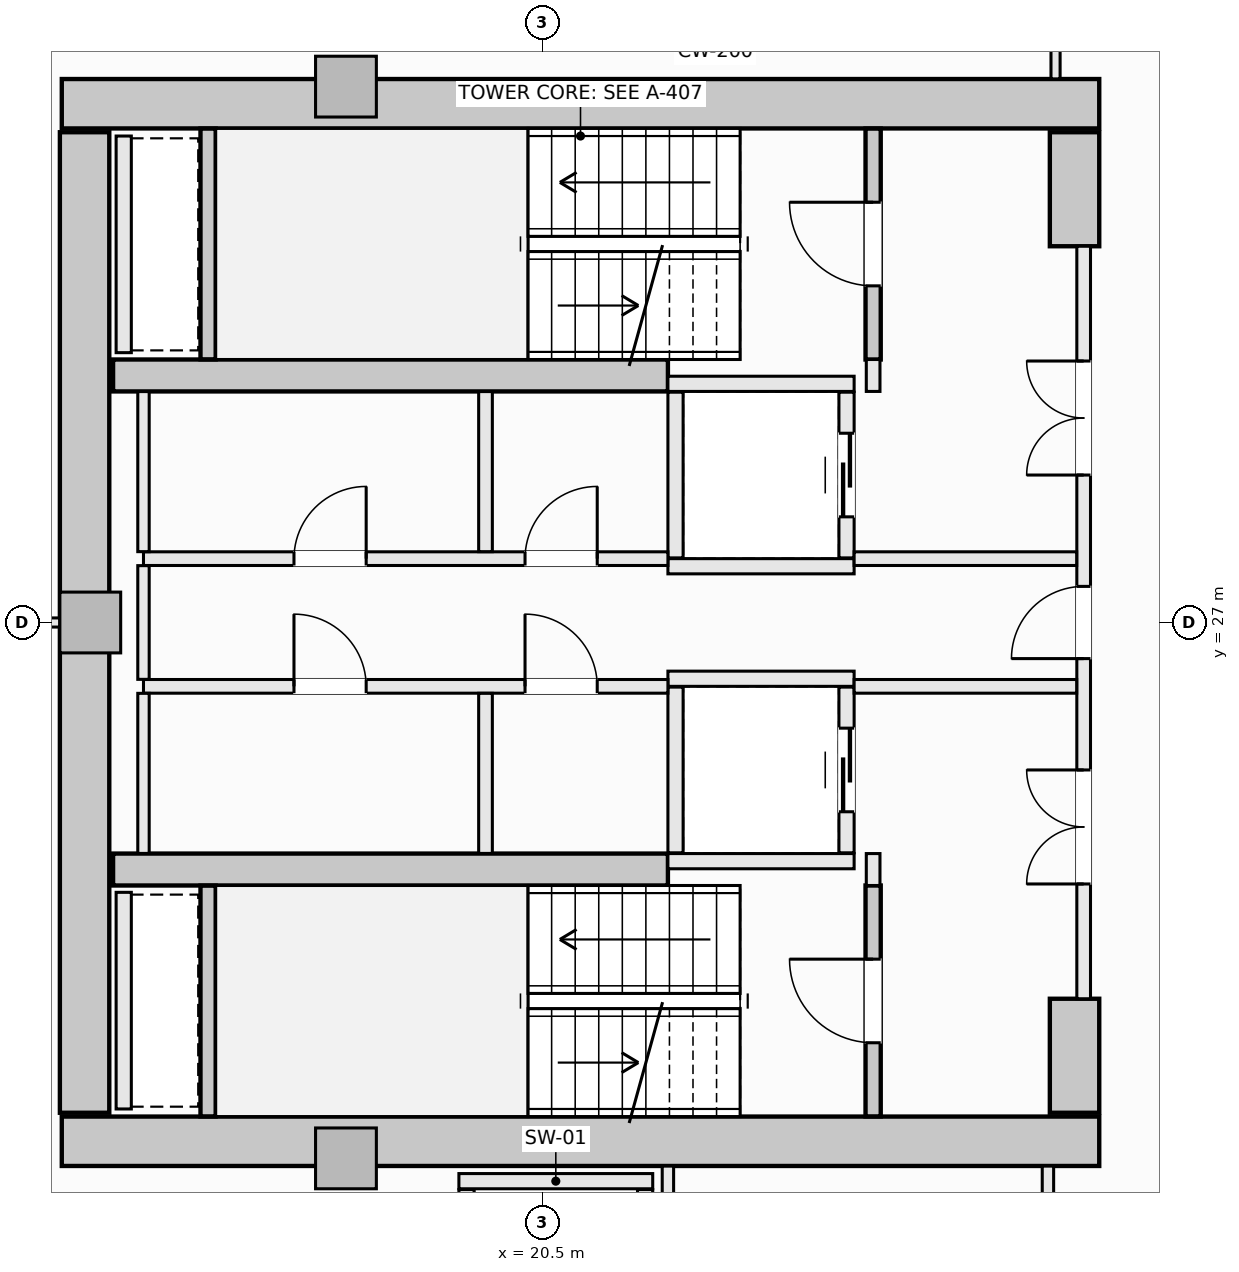
"""IFC4 building model, lengths in metres.
Left out: names, types, materials, properties, quantities, classifications, styles, units other than length and angle.
Written with IfcOpenShell. Run it as: python <this file> out.ifc"""

import sys

from ifc_helpers import new_model, si_unit, direction, frame, frame_2d, origin, origin_2d, place, context, subcontext, project, spatial, rectangle, extrude, element, fill, save


model = new_model("IFC4")
c1 = context("Model", 3, precision=1e-05, world=origin(), true_north=direction((0.0, 1.0)))
c2 = subcontext(c1, "Body", "Model", "MODEL_VIEW")
j1 = project(units=[si_unit("LENGTHUNIT", "METRE"), si_unit("PLANEANGLEUNIT", "RADIAN")], contexts=[c1])
p1 = place(None, origin())
s1 = spatial("IfcSite", under=j1, at=p1, CompositionType="ELEMENT")
p2 = place(p1, origin())
s2 = spatial("IfcBuilding", under=s1, at=p2, CompositionType="ELEMENT")
p3 = place(p2, frame((0.0, 0.0, 163.1)))
s3 = spatial("IfcBuildingStorey", under=s2, at=p3, CompositionType="ELEMENT", Elevation=163.1)
for number, where, z_axis, x_axis in (
    (1, (14.175, 33.825, -0.27), (0.0, 0.0, 1.0), (1.0, 0.0, 0.0)),
    (2, (14.175, 20.175, -0.27), (0.0, 0.0, 1.0), (1.0, 0.0, 0.0)),
):
    element("IfcWall", number, at=place(p3, frame(where, z_axis=z_axis, x_axis=x_axis)), inside=s3, PredefinedType="SHEAR", context=c2, shape_type="SweptSolid", body=[
        extrude(rectangle(XDim=13.65, YDim=0.65, at=frame_2d((6.825, 0.0))), origin(), (0.0, 0.0, 1.0), 3.4),
    ])
p4 = place(p3, frame((14.475, 20.55, -0.27), z_axis=(0.0, 0.0, 1.0), x_axis=(0.0, 1.0, 0.0)))
e3 = element("IfcWall", 3, at=p4, inside=s3, PredefinedType="SHEAR", context=c2, shape_type="SweptSolid", body=[
    extrude(rectangle(XDim=12.9, YDim=0.65, at=frame_2d((6.45, 0.0))), origin(), (0.0, 0.0, 1.0), 3.4),
])
for number, where, z_axis, x_axis in (
    (4, (27.5, 31.95, -0.27), (0.0, 0.0, 1.0), (0.0, 1.0, 0.0)),
    (5, (27.5, 20.55, -0.27), (0.0, 0.0, 1.0), (0.0, 1.0, 0.0)),
):
    element("IfcWall", number, at=place(p3, frame(where, z_axis=z_axis, x_axis=x_axis)), inside=s3, PredefinedType="SHEAR", context=c2, shape_type="SweptSolid", body=[
        extrude(rectangle(XDim=1.5, YDim=0.65, at=frame_2d((0.75, 0.0))), origin(), (0.0, 0.0, 1.0), 3.4),
    ])
for number, where, z_axis, x_axis in (
    (6, (14.85, 30.25, -0.27), (0.0, 0.0, 1.0), (1.0, 0.0, 0.0)),
    (7, (14.85, 23.75, -0.27), (0.0, 0.0, 1.0), (1.0, 0.0, 0.0)),
):
    element("IfcWall", number, at=place(p3, frame(where, z_axis=z_axis, x_axis=x_axis)), inside=s3, PredefinedType="SHEAR", context=c2, shape_type="SweptSolid", body=[
        extrude(rectangle(XDim=7.3, YDim=0.42, at=frame_2d((3.65, 0.0))), origin(), (0.0, 0.0, 1.0), 3.4),
    ])
for number, where, z_axis, x_axis in (
    (8, (17.914, 34.05, -0.27), (0.0, 0.0, 1.0), (1.0, 0.0, 0.0)),
    (9, (14.55, 27.0, -0.27), (0.0, 0.0, 1.0), (1.0, 0.0, 0.0)),
    (10, (17.914, 19.95, -0.27), (0.0, 0.0, 1.0), (1.0, 0.0, 0.0)),
):
    element("IfcColumn", number, at=place(p3, frame(where, z_axis=z_axis, x_axis=x_axis)), inside=s3, PredefinedType="PILASTER", context=c2, shape_type="SweptSolid", body=[
        extrude(rectangle(XDim=0.8, YDim=0.8, at=origin_2d()), origin(), (0.0, 0.0, 1.0), 3.4),
    ])
p5 = place(p3, frame((24.85, 30.46, -0.27), z_axis=(0.0, 0.0, 1.0), x_axis=(0.0, 1.0, 0.0)))
e11 = element("IfcWall", 11, at=p5, inside=s3, PredefinedType="SHEAR", context=c2, shape_type="SweptSolid", body=[
    extrude(rectangle(XDim=3.038, YDim=0.2, at=frame_2d((1.519, 0.0))), origin(), (0.0, 0.0, 1.0), 3.4),
])
p6 = place(p5, frame((0.969, 0.0, 0.27)))
e12 = element("IfcOpeningElement", 12, at=p6, cuts=e11, PredefinedType="OPENING", context=c2, shape_type="SweptSolid", body=[
    extrude(rectangle(XDim=1.1, YDim=2.15, at=frame_2d((0.55, 1.075))), frame((0.0, 0.11, 0.0), z_axis=(0.0, -1.0, 0.0), x_axis=(1.0, 0.0, 0.0)), (0.0, 0.0, 1.0), 0.22),
])
p7 = place(p3, frame((16.1, 30.462, -0.27), z_axis=(0.0, 0.0, 1.0), x_axis=(0.0, 1.0, 0.0)))
e13 = element("IfcWall", 13, at=p7, inside=s3, PredefinedType="SHEAR", context=c2, shape_type="SweptSolid", body=[
    extrude(rectangle(XDim=3.036, YDim=0.2, at=frame_2d((1.518, 0.0))), origin(), (0.0, 0.0, 1.0), 3.4),
])
p8 = place(p3, frame((24.85, 20.502, -0.27), z_axis=(0.0, 0.0, 1.0), x_axis=(0.0, 1.0, 0.0)))
e14 = element("IfcWall", 14, at=p8, inside=s3, PredefinedType="SHEAR", context=c2, shape_type="SweptSolid", body=[
    extrude(rectangle(XDim=3.038, YDim=0.2, at=frame_2d((1.519, 0.0))), origin(), (0.0, 0.0, 1.0), 3.4),
])
p9 = place(p8, frame((0.969, 0.0, 0.27)))
e15 = element("IfcOpeningElement", 15, at=p9, cuts=e14, PredefinedType="OPENING", context=c2, shape_type="SweptSolid", body=[
    extrude(rectangle(XDim=1.1, YDim=2.15, at=frame_2d((0.55, 1.075))), frame((0.0, 0.11, 0.0), z_axis=(0.0, -1.0, 0.0), x_axis=(1.0, 0.0, 0.0)), (0.0, 0.0, 1.0), 0.22),
])
p10 = place(p3, frame((16.1, 20.502, -0.27), z_axis=(0.0, 0.0, 1.0), x_axis=(0.0, 1.0, 0.0)))
e16 = element("IfcWall", 16, at=p10, inside=s3, PredefinedType="SHEAR", context=c2, shape_type="SweptSolid", body=[
    extrude(rectangle(XDim=3.036, YDim=0.2, at=frame_2d((1.518, 0.0))), origin(), (0.0, 0.0, 1.0), 3.4),
])
for number, where, z_axis, x_axis in (
    (17, (22.15, 30.14, 0.0), (0.0, 0.0, 1.0), (1.0, 0.0, 0.0)),
    (18, (22.15, 27.74, 0.0), (0.0, 0.0, 1.0), (1.0, 0.0, 0.0)),
):
    element("IfcWall", number, at=place(p3, frame(where, z_axis=z_axis, x_axis=x_axis)), inside=s3, PredefinedType="SOLIDWALL", context=c2, shape_type="SweptSolid", body=[
        extrude(rectangle(XDim=2.45, YDim=0.2, at=frame_2d((1.225, 0.0))), origin(), (0.0, 0.0, 1.0), 3.13),
    ])
p11 = place(p3, frame((22.25, 27.85, 0.0), z_axis=(0.0, 0.0, 1.0), x_axis=(0.0, 1.0, 0.0)))
e19 = element("IfcWall", 19, at=p11, inside=s3, PredefinedType="SOLIDWALL", context=c2, shape_type="SweptSolid", body=[
    extrude(rectangle(XDim=2.18, YDim=0.2, at=frame_2d((1.09, 0.0))), origin(), (0.0, 0.0, 1.0), 3.13),
])
p12 = place(p3, frame((24.5, 27.85, 0.0), z_axis=(0.0, 0.0, 1.0), x_axis=(0.0, 1.0, 0.0)))
e20 = element("IfcWall", 20, at=p12, inside=s3, PredefinedType="SOLIDWALL", context=c2, shape_type="SweptSolid", body=[
    extrude(rectangle(XDim=2.18, YDim=0.2, at=frame_2d((1.09, 0.0))), origin(), (0.0, 0.0, 1.0), 3.13),
])
p13 = place(p12, frame((0.54, 0.0, 0.0)))
e21 = element("IfcOpeningElement", 21, at=p13, cuts=e20, PredefinedType="OPENING", context=c2, shape_type="SweptSolid", body=[
    extrude(rectangle(XDim=1.1, YDim=2.2, at=frame_2d((0.55, 1.1))), frame((0.0, 0.11, 0.0), z_axis=(0.0, -1.0, 0.0), x_axis=(1.0, 0.0, 0.0)), (0.0, 0.0, 1.0), 0.22),
])
for number, where, z_axis, x_axis in (
    (22, (22.15, 26.26, 0.0), (0.0, 0.0, 1.0), (1.0, 0.0, 0.0)),
    (23, (22.15, 23.86, 0.0), (0.0, 0.0, 1.0), (1.0, 0.0, 0.0)),
):
    element("IfcWall", number, at=place(p3, frame(where, z_axis=z_axis, x_axis=x_axis)), inside=s3, PredefinedType="SOLIDWALL", context=c2, shape_type="SweptSolid", body=[
        extrude(rectangle(XDim=2.45, YDim=0.2, at=frame_2d((1.225, 0.0))), origin(), (0.0, 0.0, 1.0), 3.13),
    ])
p14 = place(p3, frame((22.25, 23.97, 0.0), z_axis=(0.0, 0.0, 1.0), x_axis=(0.0, 1.0, 0.0)))
e24 = element("IfcWall", 24, at=p14, inside=s3, PredefinedType="SOLIDWALL", context=c2, shape_type="SweptSolid", body=[
    extrude(rectangle(XDim=2.18, YDim=0.2, at=frame_2d((1.09, 0.0))), origin(), (0.0, 0.0, 1.0), 3.13),
])
p15 = place(p3, frame((24.5, 23.97, 0.0), z_axis=(0.0, 0.0, 1.0), x_axis=(0.0, 1.0, 0.0)))
e25 = element("IfcWall", 25, at=p15, inside=s3, PredefinedType="SOLIDWALL", context=c2, shape_type="SweptSolid", body=[
    extrude(rectangle(XDim=2.18, YDim=0.2, at=frame_2d((1.09, 0.0))), origin(), (0.0, 0.0, 1.0), 3.13),
])
p16 = place(p15, frame((0.54, 0.0, 0.0)))
e26 = element("IfcOpeningElement", 26, at=p16, cuts=e25, PredefinedType="OPENING", context=c2, shape_type="SweptSolid", body=[
    extrude(rectangle(XDim=1.1, YDim=2.2, at=frame_2d((0.55, 1.1))), frame((0.0, 0.11, 0.0), z_axis=(0.0, -1.0, 0.0), x_axis=(1.0, 0.0, 0.0)), (0.0, 0.0, 1.0), 0.22),
])
p17 = place(p3, frame((19.4, 19.65, 0.0), z_axis=(0.0, 0.0, 1.0), x_axis=(1.0, 0.0, 0.0)))
e27 = element("IfcWall", 27, at=p17, inside=s3, PredefinedType="SOLIDWALL", context=c2, shape_type="SweptSolid", body=[
    extrude(rectangle(XDim=2.55, YDim=0.2, at=frame_2d((1.275, 0.0))), origin(), (0.0, 0.0, 1.0), 3.13),
])
for number, where, z_axis, x_axis in (
    (28, (19.5, 17.01, 0.0), (0.0, 0.0, 1.0), (0.0, 1.0, 0.0)),
    (29, (21.85, 17.01, 0.0), (0.0, 0.0, 1.0), (0.0, 1.0, 0.0)),
):
    element("IfcWall", number, at=place(p3, frame(where, z_axis=z_axis, x_axis=x_axis)), inside=s3, PredefinedType="SOLIDWALL", context=c2, shape_type="SweptSolid", body=[
        extrude(rectangle(XDim=2.53, YDim=0.2, at=frame_2d((1.265, 0.0))), origin(), (0.0, 0.0, 1.0), 3.13),
    ])
for number, where, z_axis, x_axis in (
    (30, (14.99, 30.55, 0.0), (0.0, 0.0, 1.0), (0.0, 1.0, 0.0)),
    (31, (14.99, 20.6, 0.0), (0.0, 0.0, 1.0), (0.0, 1.0, 0.0)),
):
    element("IfcWall", number, at=place(p3, frame(where, z_axis=z_axis, x_axis=x_axis)), inside=s3, PredefinedType="SOLIDWALL", context=c2, shape_type="SweptSolid", body=[
        extrude(rectangle(XDim=2.85, YDim=0.2, at=frame_2d((1.425, 0.0))), origin(), (0.0, 0.0, 1.0), 3.13),
    ])
for number, where, z_axis, x_axis in (
    (32, (24.85, 23.54, 0.0), (0.0, 0.0, 1.0), (0.0, 1.0, 0.0)),
    (33, (24.85, 30.04, 0.0), (0.0, 0.0, 1.0), (0.0, 1.0, 0.0)),
):
    element("IfcWall", number, at=place(p3, frame(where, z_axis=z_axis, x_axis=x_axis)), inside=s3, PredefinedType="SOLIDWALL", context=c2, shape_type="SweptSolid", body=[
        extrude(rectangle(XDim=0.42, YDim=0.18, at=frame_2d((0.21, 0.0))), origin(), (0.0, 0.0, 1.0), 3.13),
    ])
p18 = place(p3, frame((27.62, 22.05, 0.0), z_axis=(0.0, 0.0, 1.0), x_axis=(0.0, 1.0, 0.0)))
e34 = element("IfcWall", 34, at=p18, inside=s3, PredefinedType="SOLIDWALL", context=c2, shape_type="SweptSolid", body=[
    extrude(rectangle(XDim=9.9, YDim=0.18, at=frame_2d((4.95, 0.0))), origin(), (0.0, 0.0, 1.0), 3.13),
])
p19 = place(p18, frame((4.475, 0.0, 0.0)))
e35 = element("IfcOpeningElement", 35, at=p19, cuts=e34, PredefinedType="OPENING", context=c2, shape_type="SweptSolid", body=[
    extrude(rectangle(XDim=0.95, YDim=2.1, at=frame_2d((0.475, 1.05))), frame((0.0, 0.1, 0.0), z_axis=(0.0, -1.0, 0.0), x_axis=(1.0, 0.0, 0.0)), (0.0, 0.0, 1.0), 0.2),
])
p20 = place(p18, frame((6.89, 0.0, 0.0)))
e36 = element("IfcOpeningElement", 36, at=p20, cuts=e34, PredefinedType="OPENING", context=c2, shape_type="SweptSolid", body=[
    extrude(rectangle(XDim=1.5, YDim=2.2, at=frame_2d((0.75, 1.1))), frame((0.0, 0.1, 0.0), z_axis=(0.0, -1.0, 0.0), x_axis=(1.0, 0.0, 0.0)), (0.0, 0.0, 1.0), 0.2),
])
p21 = place(p18, frame((1.51, 0.0, 0.0)))
e37 = element("IfcOpeningElement", 37, at=p21, cuts=e34, PredefinedType="OPENING", context=c2, shape_type="SweptSolid", body=[
    extrude(rectangle(XDim=1.5, YDim=2.2, at=frame_2d((0.75, 1.1))), frame((0.0, 0.1, 0.0), z_axis=(0.0, -1.0, 0.0), x_axis=(1.0, 0.0, 0.0)), (0.0, 0.0, 1.0), 0.2),
])
p22 = place(p3, frame((15.25, 27.84, 0.0), z_axis=(0.0, 0.0, 1.0), x_axis=(1.0, 0.0, 0.0)))
e38 = element("IfcWall", 38, at=p22, inside=s3, PredefinedType="SOLIDWALL", context=c2, shape_type="SweptSolid", body=[
    extrude(rectangle(XDim=6.9, YDim=0.18, at=frame_2d((3.45, 0.0))), origin(), (0.0, 0.0, 1.0), 3.13),
])
p23 = place(p22, frame((5.02, 0.0, 0.0)))
e39 = element("IfcOpeningElement", 39, at=p23, cuts=e38, PredefinedType="OPENING", context=c2, shape_type="SweptSolid", body=[
    extrude(rectangle(XDim=0.95, YDim=2.1, at=frame_2d((0.475, 1.05))), frame((0.0, 0.1, 0.0), z_axis=(0.0, -1.0, 0.0), x_axis=(1.0, 0.0, 0.0)), (0.0, 0.0, 1.0), 0.2),
])
p24 = place(p22, frame((1.98, 0.0, 0.0)))
e40 = element("IfcOpeningElement", 40, at=p24, cuts=e38, PredefinedType="OPENING", context=c2, shape_type="SweptSolid", body=[
    extrude(rectangle(XDim=0.95, YDim=2.1, at=frame_2d((0.475, 1.05))), frame((0.0, 0.1, 0.0), z_axis=(0.0, -1.0, 0.0), x_axis=(1.0, 0.0, 0.0)), (0.0, 0.0, 1.0), 0.2),
])
p25 = place(p3, frame((24.6, 27.84, 0.0), z_axis=(0.0, 0.0, 1.0), x_axis=(1.0, 0.0, 0.0)))
e41 = element("IfcWall", 41, at=p25, inside=s3, PredefinedType="SOLIDWALL", context=c2, shape_type="SweptSolid", body=[
    extrude(rectangle(XDim=2.928, YDim=0.18, at=frame_2d((1.464, 0.0))), origin(), (0.0, 0.0, 1.0), 3.13),
])
p26 = place(p3, frame((15.25, 26.16, 0.0), z_axis=(0.0, 0.0, 1.0), x_axis=(1.0, 0.0, 0.0)))
e42 = element("IfcWall", 42, at=p26, inside=s3, PredefinedType="SOLIDWALL", context=c2, shape_type="SweptSolid", body=[
    extrude(rectangle(XDim=6.9, YDim=0.18, at=frame_2d((3.45, 0.0))), origin(), (0.0, 0.0, 1.0), 3.13),
])
p27 = place(p26, frame((5.02, 0.0, 0.0)))
e43 = element("IfcOpeningElement", 43, at=p27, cuts=e42, PredefinedType="OPENING", context=c2, shape_type="SweptSolid", body=[
    extrude(rectangle(XDim=0.95, YDim=2.1, at=frame_2d((0.475, 1.05))), frame((0.0, 0.1, 0.0), z_axis=(0.0, -1.0, 0.0), x_axis=(1.0, 0.0, 0.0)), (0.0, 0.0, 1.0), 0.2),
])
p28 = place(p26, frame((1.98, 0.0, 0.0)))
e44 = element("IfcOpeningElement", 44, at=p28, cuts=e42, PredefinedType="OPENING", context=c2, shape_type="SweptSolid", body=[
    extrude(rectangle(XDim=0.95, YDim=2.1, at=frame_2d((0.475, 1.05))), frame((0.0, 0.1, 0.0), z_axis=(0.0, -1.0, 0.0), x_axis=(1.0, 0.0, 0.0)), (0.0, 0.0, 1.0), 0.2),
])
p29 = place(p3, frame((24.6, 26.16, 0.0), z_axis=(0.0, 0.0, 1.0), x_axis=(1.0, 0.0, 0.0)))
e45 = element("IfcWall", 45, at=p29, inside=s3, PredefinedType="SOLIDWALL", context=c2, shape_type="SweptSolid", body=[
    extrude(rectangle(XDim=2.928, YDim=0.18, at=frame_2d((1.464, 0.0))), origin(), (0.0, 0.0, 1.0), 3.13),
])
p30 = place(p3, frame((15.25, 23.962, 0.0), z_axis=(0.0, 0.0, 1.0), x_axis=(0.0, 1.0, 0.0)))
e46 = element("IfcWall", 46, at=p30, inside=s3, PredefinedType="PARTITIONING", context=c2, shape_type="SweptSolid", body=[
    extrude(rectangle(XDim=2.106, YDim=0.15, at=frame_2d((1.053, 0.0))), origin(), (0.0, 0.0, 1.0), 3.13),
])
p31 = place(p3, frame((15.25, 26.252, 0.0), z_axis=(0.0, 0.0, 1.0), x_axis=(0.0, 1.0, 0.0)))
e47 = element("IfcWall", 47, at=p31, inside=s3, PredefinedType="PARTITIONING", context=c2, shape_type="SweptSolid", body=[
    extrude(rectangle(XDim=1.496, YDim=0.15, at=frame_2d((0.748, 0.0))), origin(), (0.0, 0.0, 1.0), 3.13),
])
p32 = place(p3, frame((15.25, 27.932, 0.0), z_axis=(0.0, 0.0, 1.0), x_axis=(0.0, 1.0, 0.0)))
e48 = element("IfcWall", 48, at=p32, inside=s3, PredefinedType="PARTITIONING", context=c2, shape_type="SweptSolid", body=[
    extrude(rectangle(XDim=2.106, YDim=0.15, at=frame_2d((1.053, 0.0))), origin(), (0.0, 0.0, 1.0), 3.13),
])
for number, where, z_axis, x_axis in (
    (49, (19.75, 23.962, 0.0), (0.0, 0.0, 1.0), (0.0, 1.0, 0.0)),
    (50, (19.75, 27.932, 0.0), (0.0, 0.0, 1.0), (0.0, 1.0, 0.0)),
):
    element("IfcWall", number, at=place(p3, frame(where, z_axis=z_axis, x_axis=x_axis)), inside=s3, PredefinedType="SOLIDWALL", context=c2, shape_type="SweptSolid", body=[
        extrude(rectangle(XDim=2.106, YDim=0.18, at=frame_2d((1.053, 0.0))), origin(), (0.0, 0.0, 1.0), 3.13),
    ])
p33 = place(p3, frame((22.15, 17.127, 0.0), z_axis=(0.0, 0.0, 1.0), x_axis=(0.0, 1.0, 0.0)))
e51 = element("IfcWall", 51, at=p33, inside=s3, PredefinedType="PARTITIONING", context=c2, shape_type="SweptSolid", body=[
    extrude(rectangle(XDim=2.721, YDim=0.15, at=frame_2d((1.36, 0.0))), origin(), (0.0, 0.0, 1.0), 3.13),
])
p34 = place(p3, frame((27.15, 17.127, 0.0), z_axis=(0.0, 0.0, 1.0), x_axis=(0.0, 1.0, 0.0)))
e52 = element("IfcWall", 52, at=p34, inside=s3, PredefinedType="PARTITIONING", context=c2, shape_type="SweptSolid", body=[
    extrude(rectangle(XDim=2.721, YDim=0.15, at=frame_2d((1.36, 0.0))), origin(), (0.0, 0.0, 1.0), 3.13),
])
p35 = place(p34, frame((0.885, 0.0, 0.0)))
e53 = element("IfcOpeningElement", 53, at=p35, cuts=e52, PredefinedType="OPENING", context=c2, shape_type="SweptSolid", body=[
    extrude(rectangle(XDim=0.95, YDim=2.1, at=frame_2d((0.475, 1.05))), frame((0.0, 0.085, 0.0), z_axis=(0.0, -1.0, 0.0), x_axis=(1.0, 0.0, 0.0)), (0.0, 0.0, 1.0), 0.17),
])
p36 = place(p3, frame((27.25, 34.152, 0.0), z_axis=(0.0, 0.0, 1.0), x_axis=(0.0, 1.0, 0.0)))
e54 = element("IfcWall", 54, at=p36, inside=s3, PredefinedType="PARTITIONING", context=c2, shape_type="SweptSolid", body=[
    extrude(rectangle(XDim=0.806, YDim=0.12, at=frame_2d((0.403, 0.0))), origin(), (0.0, 0.0, 1.0), 3.13),
])
p37 = place(p3, frame((8.342, 27.0, 0.0), z_axis=(0.0, 0.0, 1.0), x_axis=(1.0, 0.0, 0.0)))
e55 = element("IfcWall", 55, at=p37, inside=s3, PredefinedType="PARTITIONING", context=c2, shape_type="SweptSolid", body=[
    extrude(rectangle(XDim=5.806, YDim=0.12, at=frame_2d((2.903, 0.0))), origin(), (0.0, 0.0, 1.0), 2.505),
])
p38 = place(p6, origin())
e56 = element("IfcDoor", 56, at=p38, inside=s3, OperationType="SINGLE_SWING_RIGHT", PredefinedType="DOOR", context=c2, shape_type="SweptSolid", body=[
    extrude(rectangle(XDim=1.1, YDim=2.15, at=frame_2d((0.55, 1.075))), frame((0.0, 0.025, 0.0), z_axis=(0.0, -1.0, 0.0), x_axis=(1.0, 0.0, 0.0)), (0.0, 0.0, 1.0), 0.05),
])
fill(e12, e56)
p39 = place(p9, origin())
e57 = element("IfcDoor", 57, at=p39, inside=s3, OperationType="SINGLE_SWING_RIGHT", PredefinedType="DOOR", context=c2, shape_type="SweptSolid", body=[
    extrude(rectangle(XDim=1.1, YDim=2.15, at=frame_2d((0.55, 1.075))), frame((0.0, 0.025, 0.0), z_axis=(0.0, -1.0, 0.0), x_axis=(1.0, 0.0, 0.0)), (0.0, 0.0, 1.0), 0.05),
])
fill(e15, e57)
p40 = place(p13, origin())
e58 = element("IfcDoor", 58, at=p40, inside=s3, OperationType="SLIDING_TO_LEFT", PredefinedType="DOOR", context=c2, shape_type="SweptSolid", body=[
    extrude(rectangle(XDim=1.1, YDim=2.2, at=frame_2d((0.55, 1.1))), frame((0.0, 0.025, 0.0), z_axis=(0.0, -1.0, 0.0), x_axis=(1.0, 0.0, 0.0)), (0.0, 0.0, 1.0), 0.05),
])
fill(e21, e58)
p41 = place(p16, origin())
e59 = element("IfcDoor", 59, at=p41, inside=s3, OperationType="SLIDING_TO_LEFT", PredefinedType="DOOR", context=c2, shape_type="SweptSolid", body=[
    extrude(rectangle(XDim=1.1, YDim=2.2, at=frame_2d((0.55, 1.1))), frame((0.0, 0.025, 0.0), z_axis=(0.0, -1.0, 0.0), x_axis=(1.0, 0.0, 0.0)), (0.0, 0.0, 1.0), 0.05),
])
fill(e26, e59)
p42 = place(p19, origin())
e60 = element("IfcDoor", 60, at=p42, inside=s3, OperationType="SINGLE_SWING_LEFT", PredefinedType="DOOR", context=c2, shape_type="SweptSolid", body=[
    extrude(rectangle(XDim=0.95, YDim=2.1, at=frame_2d((0.475, 1.05))), frame((0.0, 0.025, 0.0), z_axis=(0.0, -1.0, 0.0), x_axis=(1.0, 0.0, 0.0)), (0.0, 0.0, 1.0), 0.05),
])
fill(e35, e60)
p43 = place(p20, origin())
e61 = element("IfcDoor", 61, at=p43, inside=s3, OperationType="DOUBLE_DOOR_SINGLE_SWING", PredefinedType="DOOR", context=c2, shape_type="SweptSolid", body=[
    extrude(rectangle(XDim=1.5, YDim=2.2, at=frame_2d((0.75, 1.1))), frame((0.0, 0.025, 0.0), z_axis=(0.0, -1.0, 0.0), x_axis=(1.0, 0.0, 0.0)), (0.0, 0.0, 1.0), 0.05),
])
fill(e36, e61)
p44 = place(p21, origin())
e62 = element("IfcDoor", 62, at=p44, inside=s3, OperationType="DOUBLE_DOOR_SINGLE_SWING", PredefinedType="DOOR", context=c2, shape_type="SweptSolid", body=[
    extrude(rectangle(XDim=1.5, YDim=2.2, at=frame_2d((0.75, 1.1))), frame((0.0, 0.025, 0.0), z_axis=(0.0, -1.0, 0.0), x_axis=(1.0, 0.0, 0.0)), (0.0, 0.0, 1.0), 0.05),
])
fill(e37, e62)
p45 = place(p23, origin())
e63 = element("IfcDoor", 63, at=p45, inside=s3, OperationType="SINGLE_SWING_RIGHT", PredefinedType="DOOR", context=c2, shape_type="SweptSolid", body=[
    extrude(rectangle(XDim=0.95, YDim=2.1, at=frame_2d((0.475, 1.05))), frame((0.0, 0.025, 0.0), z_axis=(0.0, -1.0, 0.0), x_axis=(1.0, 0.0, 0.0)), (0.0, 0.0, 1.0), 0.05),
])
fill(e39, e63)
p46 = place(p27, origin())
e64 = element("IfcDoor", 64, at=p46, inside=s3, OperationType="SINGLE_SWING_LEFT", PredefinedType="DOOR", context=c2, shape_type="SweptSolid", body=[
    extrude(rectangle(XDim=0.95, YDim=2.1, at=frame_2d((0.475, 1.05))), frame((0.0, 0.025, 0.0), z_axis=(0.0, -1.0, 0.0), x_axis=(1.0, 0.0, 0.0)), (0.0, 0.0, 1.0), 0.05),
])
fill(e43, e64)
p47 = place(p24, origin())
e65 = element("IfcDoor", 65, at=p47, inside=s3, OperationType="SINGLE_SWING_RIGHT", PredefinedType="DOOR", context=c2, shape_type="SweptSolid", body=[
    extrude(rectangle(XDim=0.95, YDim=2.1, at=frame_2d((0.475, 1.05))), frame((0.0, 0.025, 0.0), z_axis=(0.0, -1.0, 0.0), x_axis=(1.0, 0.0, 0.0)), (0.0, 0.0, 1.0), 0.05),
])
fill(e40, e65)
p48 = place(p28, origin())
e66 = element("IfcDoor", 66, at=p48, inside=s3, OperationType="SINGLE_SWING_LEFT", PredefinedType="DOOR", context=c2, shape_type="SweptSolid", body=[
    extrude(rectangle(XDim=0.95, YDim=2.1, at=frame_2d((0.475, 1.05))), frame((0.0, 0.025, 0.0), z_axis=(0.0, -1.0, 0.0), x_axis=(1.0, 0.0, 0.0)), (0.0, 0.0, 1.0), 0.05),
])
fill(e44, e66)
save(model, sys.argv[1])
